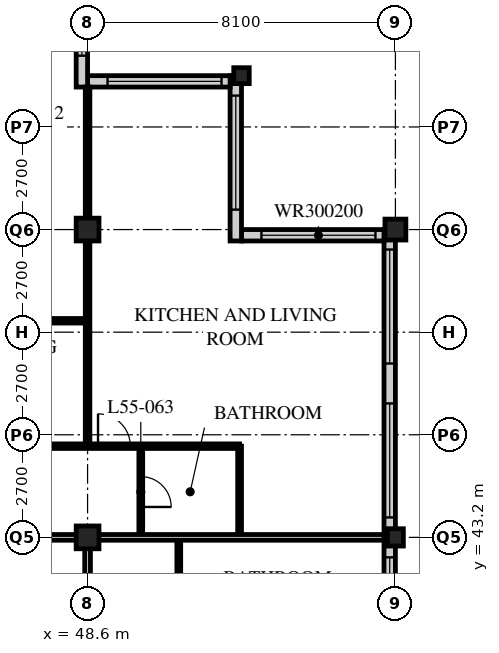
"""IFC4 building model, lengths in metres.
Left out: names, types, materials, properties, quantities, classifications, styles, units other than length and angle.
Written with IfcOpenShell. Run it as: python <this file> out.ifc"""

import sys

from ifc_helpers import new_model, si_unit, direction, frame, frame_2d, origin, origin_2d, place, context, subcontext, project, spatial, rectangle, hollow_rectangle, i_section, extrude, element, fill, save


model = new_model("IFC4")
c1 = context("Model", 3, precision=1e-05, world=origin(), true_north=direction((0.0, 1.0)))
c2 = subcontext(c1, "Body", "Model", "MODEL_VIEW")
j1 = project(units=[si_unit("LENGTHUNIT", "METRE"), si_unit("PLANEANGLEUNIT", "RADIAN")], contexts=[c1])
p1 = place(None, origin())
s1 = spatial("IfcSite", under=j1, at=p1, CompositionType="ELEMENT")
p2 = place(p1, origin())
s2 = spatial("IfcBuilding", under=s1, at=p2, CompositionType="ELEMENT")
p3 = place(p2, frame((0.0, 0.0, 213.6)))
s3 = spatial("IfcBuildingStorey", under=s2, at=p3, CompositionType="ELEMENT", Elevation=213.6)
for number, where, z_axis, x_axis in (
    (1, (48.6, 43.2, 0.0), (0.0, 0.0, 1.0), (1.0, 0.0, 0.0)),
    (2, (48.6, 51.3, 0.0), (0.0, 0.0, 1.0), (1.0, 0.0, 0.0)),
):
    element("IfcColumn", number, at=place(p3, frame(where, z_axis=z_axis, x_axis=x_axis)), inside=s3, PredefinedType="COLUMN", context=c2, shape_type="SweptSolid", body=[
        extrude(hollow_rectangle(XDim=0.6, YDim=0.6, WallThickness=0.05, at=origin_2d()), origin(), (0.0, 0.0, 1.0), 3.6),
    ])
p4 = place(p3, frame((52.65, 55.35, 0.0), z_axis=(0.0, 0.0, 1.0), x_axis=(1.0, 0.0, 0.0)))
e3 = element("IfcColumn", 3, at=p4, inside=s3, PredefinedType="COLUMN", context=c2, shape_type="SweptSolid", body=[
    extrude(i_section(OverallWidth=0.407, OverallDepth=0.419, WebThickness=0.031, FlangeThickness=0.049, FilletRadius=0.015, at=origin_2d()), origin(), (0.0, 0.0, 1.0), 3.6),
])
p5 = place(p3, frame((56.7, 43.2, 0.0), z_axis=(0.0, 0.0, 1.0), x_axis=(1.0, 0.0, 0.0)))
e4 = element("IfcColumn", 4, at=p5, inside=s3, PredefinedType="COLUMN", context=c2, shape_type="SweptSolid", body=[
    extrude(i_section(OverallWidth=0.418, OverallDepth=0.456, WebThickness=0.042, FlangeThickness=0.067, FilletRadius=0.015, at=origin_2d()), origin(), (0.0, 0.0, 1.0), 3.6),
])
p6 = place(p3, frame((56.7, 51.3, 0.0), z_axis=(0.0, 0.0, 1.0), x_axis=(1.0, 0.0, 0.0)))
e5 = element("IfcColumn", 5, at=p6, inside=s3, PredefinedType="COLUMN", context=c2, shape_type="SweptSolid", body=[
    extrude(hollow_rectangle(XDim=0.55, YDim=0.55, WallThickness=0.045, at=origin_2d()), origin(), (0.0, 0.0, 1.0), 3.6),
])
p7 = place(p3, frame((56.55, 19.2, 0.0), z_axis=(0.0, 0.0, 1.0), x_axis=(0.0, 1.0, 0.0)))
e6 = element("IfcWall", 6, at=p7, inside=s3, PredefinedType="SOLIDWALL", context=c2, shape_type="SweptSolid", body=[
    extrude(rectangle(XDim=32.1, YDim=0.3, at=frame_2d((16.05, 0.0))), origin(), (0.0, 0.0, 1.0), 3.39),
])
p8 = place(p7, frame((0.225, 0.0, 0.6)))
e7 = element("IfcOpeningElement", 7, at=p8, cuts=e6, PredefinedType="OPENING", context=c2, shape_type="SweptSolid", body=[
    extrude(rectangle(XDim=3.0, YDim=2.4, at=frame_2d((1.5, 1.2))), frame((0.0, 0.16, 0.0), z_axis=(0.0, -1.0, 0.0), x_axis=(1.0, 0.0, 0.0)), (0.0, 0.0, 1.0), 0.32),
])
p9 = place(p7, frame((4.275, 0.0, 0.6)))
e8 = element("IfcOpeningElement", 8, at=p9, cuts=e6, PredefinedType="OPENING", context=c2, shape_type="SweptSolid", body=[
    extrude(rectangle(XDim=3.0, YDim=2.4, at=frame_2d((1.5, 1.2))), frame((0.0, 0.16, 0.0), z_axis=(0.0, -1.0, 0.0), x_axis=(1.0, 0.0, 0.0)), (0.0, 0.0, 1.0), 0.32),
])
p10 = place(p7, frame((8.325, 0.0, 0.6)))
e9 = element("IfcOpeningElement", 9, at=p10, cuts=e6, PredefinedType="OPENING", context=c2, shape_type="SweptSolid", body=[
    extrude(rectangle(XDim=3.0, YDim=2.4, at=frame_2d((1.5, 1.2))), frame((0.0, 0.16, 0.0), z_axis=(0.0, -1.0, 0.0), x_axis=(1.0, 0.0, 0.0)), (0.0, 0.0, 1.0), 0.32),
])
p11 = place(p7, frame((12.375, 0.0, 0.6)))
e10 = element("IfcOpeningElement", 10, at=p11, cuts=e6, PredefinedType="OPENING", context=c2, shape_type="SweptSolid", body=[
    extrude(rectangle(XDim=3.0, YDim=2.4, at=frame_2d((1.5, 1.2))), frame((0.0, 0.16, 0.0), z_axis=(0.0, -1.0, 0.0), x_axis=(1.0, 0.0, 0.0)), (0.0, 0.0, 1.0), 0.32),
])
p12 = place(p7, frame((16.425, 0.0, 0.6)))
e11 = element("IfcOpeningElement", 11, at=p12, cuts=e6, PredefinedType="OPENING", context=c2, shape_type="SweptSolid", body=[
    extrude(rectangle(XDim=3.0, YDim=2.4, at=frame_2d((1.5, 1.2))), frame((0.0, 0.16, 0.0), z_axis=(0.0, -1.0, 0.0), x_axis=(1.0, 0.0, 0.0)), (0.0, 0.0, 1.0), 0.32),
])
p13 = place(p7, frame((20.475, 0.0, 0.6)))
e12 = element("IfcOpeningElement", 12, at=p13, cuts=e6, PredefinedType="OPENING", context=c2, shape_type="SweptSolid", body=[
    extrude(rectangle(XDim=3.0, YDim=2.4, at=frame_2d((1.5, 1.2))), frame((0.0, 0.16, 0.0), z_axis=(0.0, -1.0, 0.0), x_axis=(1.0, 0.0, 0.0)), (0.0, 0.0, 1.0), 0.32),
])
p14 = place(p7, frame((24.525, 0.0, 0.6)))
e13 = element("IfcOpeningElement", 13, at=p14, cuts=e6, PredefinedType="OPENING", context=c2, shape_type="SweptSolid", body=[
    extrude(rectangle(XDim=3.0, YDim=2.4, at=frame_2d((1.5, 1.2))), frame((0.0, 0.16, 0.0), z_axis=(0.0, -1.0, 0.0), x_axis=(1.0, 0.0, 0.0)), (0.0, 0.0, 1.0), 0.32),
])
p15 = place(p7, frame((28.575, 0.0, 0.6)))
e14 = element("IfcOpeningElement", 14, at=p15, cuts=e6, PredefinedType="OPENING", context=c2, shape_type="SweptSolid", body=[
    extrude(rectangle(XDim=3.0, YDim=2.4, at=frame_2d((1.5, 1.2))), frame((0.0, 0.16, 0.0), z_axis=(0.0, -1.0, 0.0), x_axis=(1.0, 0.0, 0.0)), (0.0, 0.0, 1.0), 0.32),
])
p16 = place(p3, frame((56.4, 51.15, 0.0), z_axis=(0.0, 0.0, 1.0), x_axis=(-1.0, 0.0, 0.0)))
e15 = element("IfcWall", 15, at=p16, inside=s3, PredefinedType="SOLIDWALL", context=c2, shape_type="SweptSolid", body=[
    extrude(rectangle(XDim=3.75, YDim=0.3, at=frame_2d((1.875, 0.0))), origin(), (0.0, 0.0, 1.0), 3.39),
])
p17 = place(p16, frame((0.225, 0.0, 0.6)))
e16 = element("IfcOpeningElement", 16, at=p17, cuts=e15, PredefinedType="OPENING", context=c2, shape_type="SweptSolid", body=[
    extrude(rectangle(XDim=3.0, YDim=2.0, at=frame_2d((1.5, 1.0))), frame((0.0, 0.16, 0.0), z_axis=(0.0, -1.0, 0.0), x_axis=(1.0, 0.0, 0.0)), (0.0, 0.0, 1.0), 0.32),
])
p18 = place(p3, frame((52.5, 51.0, 0.0), z_axis=(0.0, 0.0, 1.0), x_axis=(0.0, 1.0, 0.0)))
e17 = element("IfcWall", 17, at=p18, inside=s3, PredefinedType="SOLIDWALL", context=c2, shape_type="SweptSolid", body=[
    extrude(rectangle(XDim=4.35, YDim=0.3, at=frame_2d((2.175, 0.0))), origin(), (0.0, 0.0, 1.0), 3.39),
])
p19 = place(p18, frame((0.825, 0.0, 0.6)))
e18 = element("IfcOpeningElement", 18, at=p19, cuts=e17, PredefinedType="OPENING", context=c2, shape_type="SweptSolid", body=[
    extrude(rectangle(XDim=3.0, YDim=2.0, at=frame_2d((1.5, 1.0))), frame((0.0, 0.16, 0.0), z_axis=(0.0, -1.0, 0.0), x_axis=(1.0, 0.0, 0.0)), (0.0, 0.0, 1.0), 0.32),
])
p20 = place(p3, frame((52.35, 55.2, 0.0), z_axis=(0.0, 0.0, 1.0), x_axis=(-1.0, 0.0, 0.0)))
e19 = element("IfcWall", 19, at=p20, inside=s3, PredefinedType="SOLIDWALL", context=c2, shape_type="SweptSolid", body=[
    extrude(rectangle(XDim=3.75, YDim=0.3, at=frame_2d((1.875, 0.0))), origin(), (0.0, 0.0, 1.0), 3.39),
])
p21 = place(p20, frame((0.225, 0.0, 0.6)))
e20 = element("IfcOpeningElement", 20, at=p21, cuts=e19, PredefinedType="OPENING", context=c2, shape_type="SweptSolid", body=[
    extrude(rectangle(XDim=3.0, YDim=2.0, at=frame_2d((1.5, 1.0))), frame((0.0, 0.16, 0.0), z_axis=(0.0, -1.0, 0.0), x_axis=(1.0, 0.0, 0.0)), (0.0, 0.0, 1.0), 0.32),
])
p22 = place(p3, frame((48.45, 55.05, 0.0), z_axis=(0.0, 0.0, 1.0), x_axis=(0.0, 1.0, 0.0)))
e21 = element("IfcWall", 21, at=p22, inside=s3, PredefinedType="SOLIDWALL", context=c2, shape_type="SweptSolid", body=[
    extrude(rectangle(XDim=4.35, YDim=0.3, at=frame_2d((2.175, 0.0))), origin(), (0.0, 0.0, 1.0), 3.39),
])
p23 = place(p22, frame((0.825, 0.0, 0.6)))
e22 = element("IfcOpeningElement", 22, at=p23, cuts=e21, PredefinedType="OPENING", context=c2, shape_type="SweptSolid", body=[
    extrude(rectangle(XDim=3.0, YDim=2.0, at=frame_2d((1.5, 1.0))), frame((0.0, 0.16, 0.0), z_axis=(0.0, -1.0, 0.0), x_axis=(1.0, 0.0, 0.0)), (0.0, 0.0, 1.0), 0.32),
])
p24 = place(p3, frame((12.15, 43.2, 0.0), z_axis=(0.0, 0.0, 1.0), x_axis=(1.0, 0.0, 0.0)))
e23 = element("IfcWall", 23, at=p24, inside=s3, PredefinedType="PARTITIONING", context=c2, shape_type="SweptSolid", body=[
    extrude(rectangle(XDim=36.45, YDim=0.15, at=frame_2d((18.225, 0.0))), origin(), (0.0, 0.0, 1.0), 2.778),
])
p25 = place(p24, frame((4.95, 0.0, 0.0)))
e24 = element("IfcOpeningElement", 24, at=p25, cuts=e23, PredefinedType="OPENING", context=c2, shape_type="SweptSolid", body=[
    extrude(rectangle(XDim=1.0, YDim=2.1, at=frame_2d((0.5, 1.05))), frame((0.0, 0.085, 0.0), z_axis=(0.0, -1.0, 0.0), x_axis=(1.0, 0.0, 0.0)), (0.0, 0.0, 1.0), 0.17),
])
p26 = place(p24, frame((25.0, 0.0, 0.0)))
e25 = element("IfcOpeningElement", 25, at=p26, cuts=e23, PredefinedType="OPENING", context=c2, shape_type="SweptSolid", body=[
    extrude(rectangle(XDim=1.0, YDim=2.1, at=frame_2d((0.5, 1.05))), frame((0.0, 0.085, 0.0), z_axis=(0.0, -1.0, 0.0), x_axis=(1.0, 0.0, 0.0)), (0.0, 0.0, 1.0), 0.17),
])
p27 = place(p24, frame((30.7, 0.0, 0.0)))
e26 = element("IfcOpeningElement", 26, at=p27, cuts=e23, PredefinedType="OPENING", context=c2, shape_type="SweptSolid", body=[
    extrude(rectangle(XDim=1.0, YDim=2.1, at=frame_2d((0.5, 1.05))), frame((0.0, 0.085, 0.0), z_axis=(0.0, -1.0, 0.0), x_axis=(1.0, 0.0, 0.0)), (0.0, 0.0, 1.0), 0.17),
])
p28 = place(p24, frame((33.925, 0.0, 0.0)))
e27 = element("IfcOpeningElement", 27, at=p28, cuts=e23, PredefinedType="OPENING", context=c2, shape_type="SweptSolid", body=[
    extrude(rectangle(XDim=1.0, YDim=2.1, at=frame_2d((0.5, 1.05))), frame((0.0, 0.085, 0.0), z_axis=(0.0, -1.0, 0.0), x_axis=(1.0, 0.0, 0.0)), (0.0, 0.0, 1.0), 0.17),
])
p29 = place(p24, frame((1.525, 0.0, 0.0)))
e28 = element("IfcOpeningElement", 28, at=p29, cuts=e23, PredefinedType="OPENING", context=c2, shape_type="SweptSolid", body=[
    extrude(rectangle(XDim=1.0, YDim=2.1, at=frame_2d((0.5, 1.05))), frame((0.0, 0.085, 0.0), z_axis=(0.0, -1.0, 0.0), x_axis=(1.0, 0.0, 0.0)), (0.0, 0.0, 1.0), 0.17),
])
p30 = place(p3, frame((48.6, 18.9, 0.0), z_axis=(0.0, 0.0, 1.0), x_axis=(0.0, 1.0, 0.0)))
e29 = element("IfcWall", 29, at=p30, inside=s3, PredefinedType="PARTITIONING", context=c2, shape_type="SweptSolid", body=[
    extrude(rectangle(XDim=24.3, YDim=0.15, at=frame_2d((12.15, 0.0))), origin(), (0.0, 0.0, 1.0), 2.778),
])
p31 = place(p30, frame((0.9, 0.0, 0.0)))
e30 = element("IfcOpeningElement", 30, at=p31, cuts=e29, PredefinedType="OPENING", context=c2, shape_type="SweptSolid", body=[
    extrude(rectangle(XDim=1.0, YDim=2.1, at=frame_2d((0.5, 1.05))), frame((0.0, 0.085, 0.0), z_axis=(0.0, -1.0, 0.0), x_axis=(1.0, 0.0, 0.0)), (0.0, 0.0, 1.0), 0.17),
])
p32 = place(p30, frame((20.95, 0.0, 0.0)))
e31 = element("IfcOpeningElement", 31, at=p32, cuts=e29, PredefinedType="OPENING", context=c2, shape_type="SweptSolid", body=[
    extrude(rectangle(XDim=1.0, YDim=2.1, at=frame_2d((0.5, 1.05))), frame((0.0, 0.085, 0.0), z_axis=(0.0, -1.0, 0.0), x_axis=(1.0, 0.0, 0.0)), (0.0, 0.0, 1.0), 0.17),
])
p33 = place(p3, frame((51.0, 41.0, 0.0), z_axis=(0.0, 0.0, 1.0), x_axis=(0.0, 1.0, 0.0)))
e32 = element("IfcWall", 32, at=p33, inside=s3, PredefinedType="PARTITIONING", context=c2, shape_type="SweptSolid", body=[
    extrude(rectangle(XDim=2.2, YDim=0.1, at=frame_2d((1.1, 0.0))), origin(), (0.0, 0.0, 1.0), 3.39),
])
p34 = place(p3, frame((44.55, 45.6, 0.0), z_axis=(0.0, 0.0, 1.0), x_axis=(1.0, 0.0, 0.0)))
e33 = element("IfcWall", 33, at=p34, inside=s3, PredefinedType="PARTITIONING", context=c2, shape_type="SweptSolid", body=[
    extrude(rectangle(XDim=8.05, YDim=0.12, at=frame_2d((4.025, 0.0))), origin(), (0.0, 0.0, 1.0), 3.39),
])
p35 = place(p34, frame((0.475, 0.0, 0.0)))
e34 = element("IfcOpeningElement", 34, at=p35, cuts=e33, PredefinedType="OPENING", context=c2, shape_type="SweptSolid", body=[
    extrude(rectangle(XDim=0.85, YDim=2.1, at=frame_2d((0.425, 1.05))), frame((0.0, 0.07, 0.0), z_axis=(0.0, -1.0, 0.0), x_axis=(1.0, 0.0, 0.0)), (0.0, 0.0, 1.0), 0.14),
])
p36 = place(p34, frame((4.325, 0.0, 0.0)))
e35 = element("IfcOpeningElement", 35, at=p36, cuts=e33, PredefinedType="OPENING", context=c2, shape_type="SweptSolid", body=[
    extrude(rectangle(XDim=0.85, YDim=2.1, at=frame_2d((0.425, 1.05))), frame((0.0, 0.07, 0.0), z_axis=(0.0, -1.0, 0.0), x_axis=(1.0, 0.0, 0.0)), (0.0, 0.0, 1.0), 0.14),
])
p37 = place(p3, frame((50.0, 43.2, 0.0), z_axis=(0.0, 0.0, 1.0), x_axis=(0.0, 1.0, 0.0)))
e36 = element("IfcWall", 36, at=p37, inside=s3, PredefinedType="PARTITIONING", context=c2, shape_type="SweptSolid", body=[
    extrude(rectangle(XDim=2.4, YDim=0.1, at=frame_2d((1.2, 0.0))), origin(), (0.0, 0.0, 1.0), 3.39),
])
p38 = place(p37, frame((0.8, 0.0, 0.0)))
e37 = element("IfcOpeningElement", 37, at=p38, cuts=e36, PredefinedType="OPENING", context=c2, shape_type="SweptSolid", body=[
    extrude(rectangle(XDim=0.8, YDim=2.1, at=frame_2d((0.4, 1.05))), frame((0.0, 0.06, 0.0), z_axis=(0.0, -1.0, 0.0), x_axis=(1.0, 0.0, 0.0)), (0.0, 0.0, 1.0), 0.12),
])
p39 = place(p3, frame((52.6, 43.2, 0.0), z_axis=(0.0, 0.0, 1.0), x_axis=(0.0, 1.0, 0.0)))
e38 = element("IfcWall", 38, at=p39, inside=s3, PredefinedType="PARTITIONING", context=c2, shape_type="SweptSolid", body=[
    extrude(rectangle(XDim=2.4, YDim=0.1, at=frame_2d((1.2, 0.0))), origin(), (0.0, 0.0, 1.0), 3.39),
])
p40 = place(p3, frame((48.6, 45.6, 0.0), z_axis=(0.0, 0.0, 1.0), x_axis=(0.0, 1.0, 0.0)))
e39 = element("IfcWall", 39, at=p40, inside=s3, PredefinedType="PARTITIONING", context=c2, shape_type="SweptSolid", body=[
    extrude(rectangle(XDim=9.45, YDim=0.12, at=frame_2d((4.725, 0.0))), origin(), (0.0, 0.0, 1.0), 2.778),
])
p41 = place(p3, frame((48.6, 43.2, 0.0), z_axis=(0.0, 0.0, 1.0), x_axis=(1.0, 0.0, 0.0)))
e40 = element("IfcWall", 40, at=p41, inside=s3, PredefinedType="PARTITIONING", context=c2, shape_type="SweptSolid", body=[
    extrude(rectangle(XDim=7.8, YDim=0.15, at=frame_2d((3.9, 0.0))), origin(), (0.0, 0.0, 1.0), 2.778),
])
p42 = place(p3, frame((44.55, 48.9, 0.0), z_axis=(0.0, 0.0, 1.0), x_axis=(1.0, 0.0, 0.0)))
e41 = element("IfcWall", 41, at=p42, inside=s3, PredefinedType="PARTITIONING", context=c2, shape_type="SweptSolid", body=[
    extrude(rectangle(XDim=4.05, YDim=0.12, at=frame_2d((2.025, 0.0))), origin(), (0.0, 0.0, 1.0), 3.39),
])
p43 = place(p42, frame((1.6, 0.0, 0.0)))
e42 = element("IfcOpeningElement", 42, at=p43, cuts=e41, PredefinedType="OPENING", context=c2, shape_type="SweptSolid", body=[
    extrude(rectangle(XDim=0.85, YDim=2.1, at=frame_2d((0.425, 1.05))), frame((0.0, 0.07, 0.0), z_axis=(0.0, -1.0, 0.0), x_axis=(1.0, 0.0, 0.0)), (0.0, 0.0, 1.0), 0.14),
])
p44 = place(p13, origin())
e43 = element("IfcWindow", 43, at=p44, inside=s3, PartitioningType="SINGLE_PANEL", PredefinedType="WINDOW", context=c2, shape_type="SweptSolid", body=[
    extrude(rectangle(XDim=3.0, YDim=2.4, at=frame_2d((1.5, 1.2))), frame((0.0, 0.03, 0.0), z_axis=(0.0, -1.0, 0.0), x_axis=(1.0, 0.0, 0.0)), (0.0, 0.0, 1.0), 0.06),
])
fill(e12, e43)
p45 = place(p14, origin())
e44 = element("IfcWindow", 44, at=p45, inside=s3, PartitioningType="SINGLE_PANEL", PredefinedType="WINDOW", context=c2, shape_type="SweptSolid", body=[
    extrude(rectangle(XDim=3.0, YDim=2.4, at=frame_2d((1.5, 1.2))), frame((0.0, 0.03, 0.0), z_axis=(0.0, -1.0, 0.0), x_axis=(1.0, 0.0, 0.0)), (0.0, 0.0, 1.0), 0.06),
])
fill(e13, e44)
p46 = place(p15, origin())
e45 = element("IfcWindow", 45, at=p46, inside=s3, PartitioningType="SINGLE_PANEL", PredefinedType="WINDOW", context=c2, shape_type="SweptSolid", body=[
    extrude(rectangle(XDim=3.0, YDim=2.4, at=frame_2d((1.5, 1.2))), frame((0.0, 0.03, 0.0), z_axis=(0.0, -1.0, 0.0), x_axis=(1.0, 0.0, 0.0)), (0.0, 0.0, 1.0), 0.06),
])
fill(e14, e45)
p47 = place(p17, origin())
e46 = element("IfcWindow", 46, at=p47, inside=s3, PartitioningType="SINGLE_PANEL", PredefinedType="WINDOW", context=c2, shape_type="SweptSolid", body=[
    extrude(rectangle(XDim=3.0, YDim=2.0, at=frame_2d((1.5, 1.0))), frame((0.0, 0.03, 0.0), z_axis=(0.0, -1.0, 0.0), x_axis=(1.0, 0.0, 0.0)), (0.0, 0.0, 1.0), 0.06),
])
fill(e16, e46)
p48 = place(p19, origin())
e47 = element("IfcWindow", 47, at=p48, inside=s3, PartitioningType="SINGLE_PANEL", PredefinedType="WINDOW", context=c2, shape_type="SweptSolid", body=[
    extrude(rectangle(XDim=3.0, YDim=2.0, at=frame_2d((1.5, 1.0))), frame((0.0, 0.03, 0.0), z_axis=(0.0, -1.0, 0.0), x_axis=(1.0, 0.0, 0.0)), (0.0, 0.0, 1.0), 0.06),
])
fill(e18, e47)
p49 = place(p21, origin())
e48 = element("IfcWindow", 48, at=p49, inside=s3, PartitioningType="SINGLE_PANEL", PredefinedType="WINDOW", context=c2, shape_type="SweptSolid", body=[
    extrude(rectangle(XDim=3.0, YDim=2.0, at=frame_2d((1.5, 1.0))), frame((0.0, 0.03, 0.0), z_axis=(0.0, -1.0, 0.0), x_axis=(1.0, 0.0, 0.0)), (0.0, 0.0, 1.0), 0.06),
])
fill(e20, e48)
p50 = place(p23, origin())
e49 = element("IfcWindow", 49, at=p50, inside=s3, PartitioningType="SINGLE_PANEL", PredefinedType="WINDOW", context=c2, shape_type="SweptSolid", body=[
    extrude(rectangle(XDim=3.0, YDim=2.0, at=frame_2d((1.5, 1.0))), frame((0.0, 0.03, 0.0), z_axis=(0.0, -1.0, 0.0), x_axis=(1.0, 0.0, 0.0)), (0.0, 0.0, 1.0), 0.06),
])
fill(e22, e49)
p51 = place(p38, origin())
e50 = element("IfcDoor", 50, at=p51, inside=s3, OperationType="SINGLE_SWING_RIGHT", PredefinedType="DOOR", context=c2, shape_type="SweptSolid", body=[
    extrude(rectangle(XDim=0.8, YDim=2.1, at=frame_2d((0.4, 1.05))), frame((0.0, 0.025, 0.0), z_axis=(0.0, -1.0, 0.0), x_axis=(1.0, 0.0, 0.0)), (0.0, 0.0, 1.0), 0.05),
])
fill(e37, e50)
p52 = place(p36, origin())
e51 = element("IfcDoor", 51, at=p52, inside=s3, OperationType="SINGLE_SWING_LEFT", PredefinedType="DOOR", context=c2, shape_type="SweptSolid", body=[
    extrude(rectangle(XDim=0.85, YDim=2.1, at=frame_2d((0.425, 1.05))), frame((0.0, 0.025, 0.0), z_axis=(0.0, -1.0, 0.0), x_axis=(1.0, 0.0, 0.0)), (0.0, 0.0, 1.0), 0.05),
])
fill(e35, e51)
save(model, sys.argv[1])
